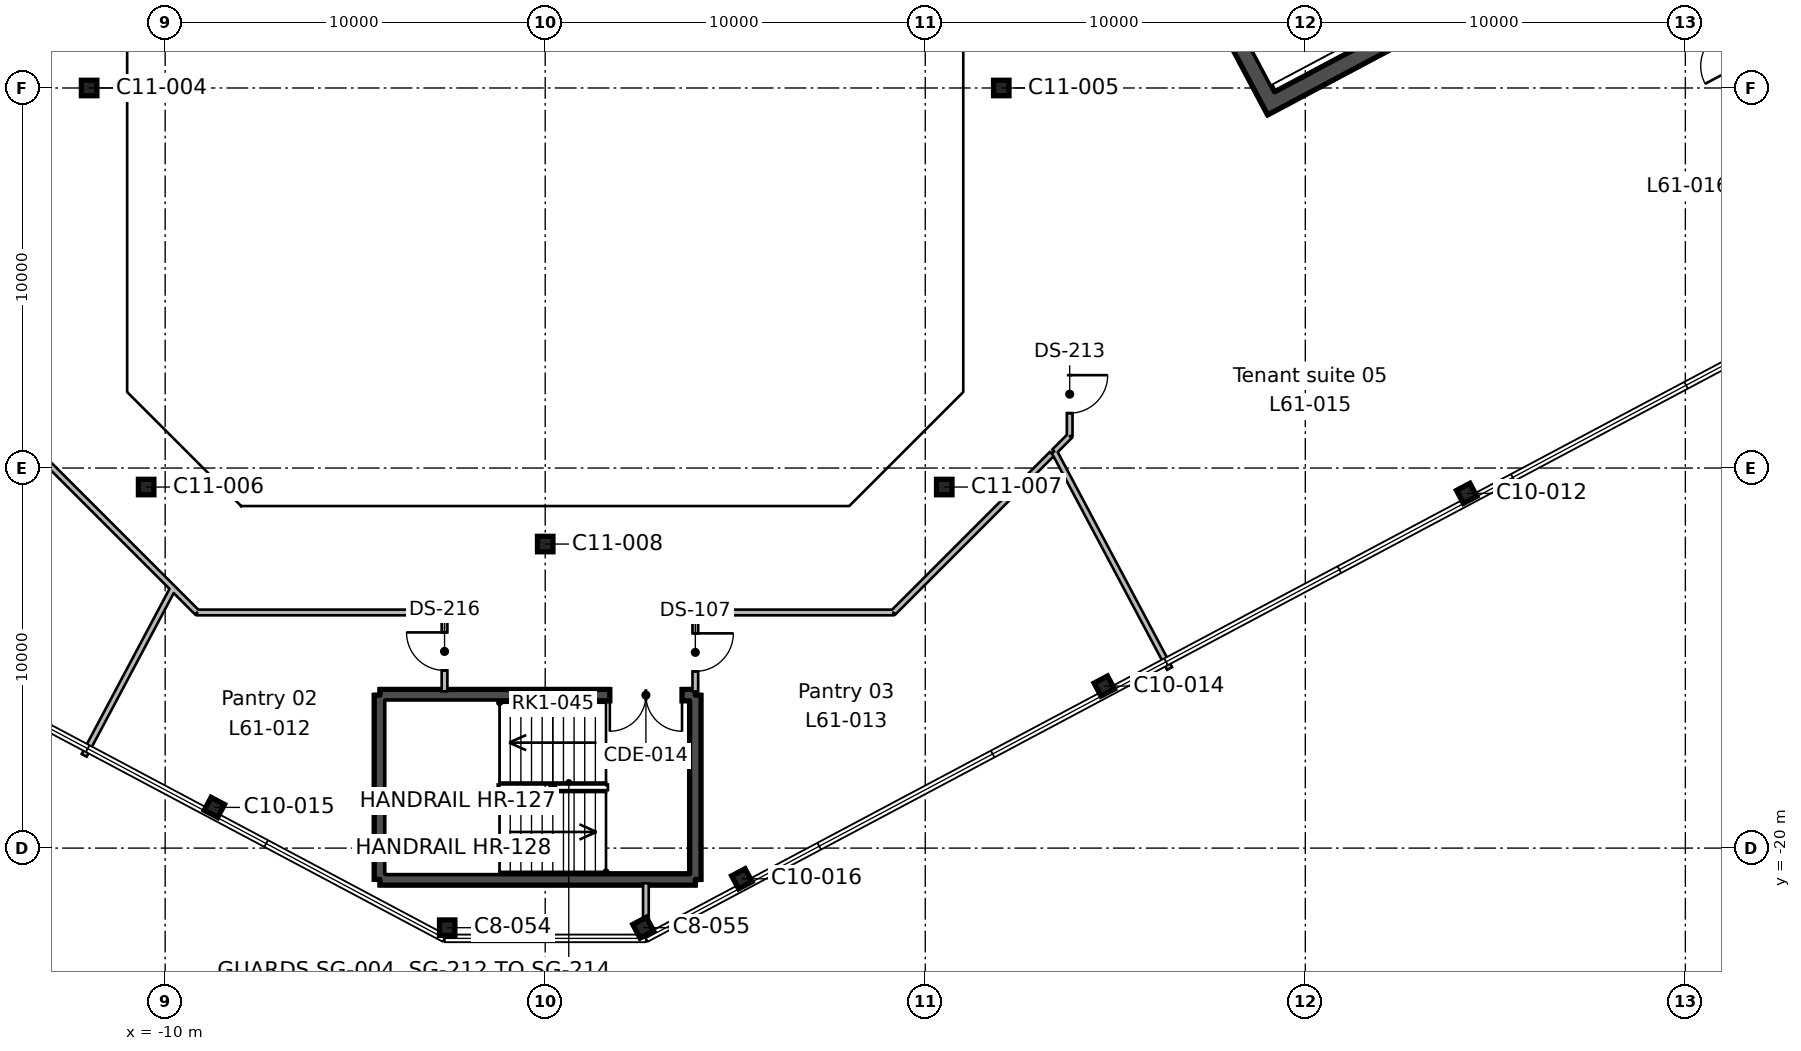
"""IFC4 building model, lengths in metres.
Left out: names, types, materials, properties, quantities, classifications, styles, units other than length and angle.
Written with IfcOpenShell. Run it as: python <this file> out.ifc"""

import sys

from ifc_helpers import new_model, si_unit, direction, frame, frame_2d, origin, origin_2d, place, context, subcontext, project, spatial, rectangle, hollow_rectangle, i_section, extrude, element, fill, save


model = new_model("IFC4")
c1 = context("Model", 3, precision=1e-05, world=origin(), true_north=direction((0.0, 1.0)))
c2 = subcontext(c1, "Body", "Model", "MODEL_VIEW")
j1 = project(units=[si_unit("LENGTHUNIT", "METRE"), si_unit("PLANEANGLEUNIT", "RADIAN")], contexts=[c1])
p1 = place(None, origin())
s1 = spatial("IfcSite", under=j1, at=p1, CompositionType="ELEMENT")
p2 = place(p1, origin())
s2 = spatial("IfcBuilding", under=s1, at=p2, CompositionType="ELEMENT")
p3 = place(p2, frame((0.0, 0.0, 273.6)))
s3 = spatial("IfcBuildingStorey", under=s2, at=p3, CompositionType="ELEMENT", Elevation=273.6)
for number, where, z_axis, x_axis in (
    (1, (-2.579, -22.094, 0.0), (0.0, 0.0, 1.0), (1.0, 0.0, 0.0)),
    (2, (2.579, -22.094, 0.0), (0.0, 0.0, 1.0), (0.883, 0.469, 0.0)),
):
    element("IfcColumn", number, at=place(p3, frame(where, z_axis=z_axis, x_axis=x_axis)), inside=s3, PredefinedType="COLUMN", context=c2, shape_type="SweptSolid", body=[
        extrude(i_section(OverallWidth=0.404, OverallDepth=0.406, WebThickness=0.027, FlangeThickness=0.044, FilletRadius=0.015, at=origin_2d()), origin(), (0.0, 0.0, 1.0), 3.9),
    ])
for number, where, z_axis, x_axis in (
    (3, (5.174, -20.807, 0.0), (0.0, 0.0, 1.0), (0.883, 0.469, 0.0)),
    (4, (-8.705, -18.929, 0.0), (0.0, 0.0, 1.0), (0.883, -0.469, 0.0)),
    (5, (14.71, -15.736, 0.0), (0.0, 0.0, 1.0), (0.883, 0.469, 0.0)),
):
    element("IfcColumn", number, at=place(p3, frame(where, z_axis=z_axis, x_axis=x_axis)), inside=s3, PredefinedType="COLUMN", context=c2, shape_type="SweptSolid", body=[
        extrude(i_section(OverallWidth=0.399, OverallDepth=0.386, WebThickness=0.021, FlangeThickness=0.033, FilletRadius=0.015, at=origin_2d()), origin(), (0.0, 0.0, 1.0), 3.9),
    ])
p4 = place(p3, frame((0.0, -12.0, 0.0), z_axis=(0.0, 0.0, 1.0), x_axis=(1.0, 0.0, 0.0)))
e6 = element("IfcColumn", 6, at=p4, inside=s3, PredefinedType="COLUMN", context=c2, shape_type="SweptSolid", body=[
    extrude(hollow_rectangle(XDim=0.406, YDim=0.406, WallThickness=0.009, InnerFilletRadius=0.004, OuterFilletRadius=0.013, at=origin_2d()), origin(), (0.0, 0.0, 1.0), 3.9),
])
p5 = place(p3, frame((24.245, -10.666, 0.0), z_axis=(0.0, 0.0, 1.0), x_axis=(0.882947592859, 0.469471562786, 0.0)))
e7 = element("IfcColumn", 7, at=p5, inside=s3, PredefinedType="COLUMN", context=c2, shape_type="SweptSolid", body=[
    extrude(i_section(OverallWidth=0.399, OverallDepth=0.386, WebThickness=0.021, FlangeThickness=0.033, FilletRadius=0.015, at=origin_2d()), origin(), (0.0, 0.0, 1.0), 3.9),
])
for number, where, z_axis, x_axis in (
    (8, (-10.5, -10.5, 0.0), (0.0, 0.0, 1.0), (1.0, 0.0, 0.0)),
    (9, (10.5, -10.5, 0.0), (0.0, 0.0, 1.0), (1.0, 0.0, 0.0)),
    (10, (-12.0, 0.0, 0.0), (0.0, 0.0, 1.0), (1.0, 0.0, 0.0)),
    (11, (12.0, 0.0, 0.0), (0.0, 0.0, 1.0), (1.0, 0.0, 0.0)),
):
    element("IfcColumn", number, at=place(p3, frame(where, z_axis=z_axis, x_axis=x_axis)), inside=s3, PredefinedType="COLUMN", context=c2, shape_type="SweptSolid", body=[
        extrude(hollow_rectangle(XDim=0.406, YDim=0.406, WallThickness=0.009, InnerFilletRadius=0.004, OuterFilletRadius=0.013, at=origin_2d()), origin(), (0.0, 0.0, 1.0), 3.9),
    ])
p6 = place(p3, frame((19.207, -0.604, 0.0), z_axis=(0.0, 0.0, 1.0), x_axis=(-0.469467968382, 0.882949504028, 0.0)))
e12 = element("IfcWall", 12, at=p6, inside=s3, PredefinedType="SHEAR", context=c2, shape_type="SweptSolid", body=[
    extrude(rectangle(XDim=19.1, YDim=0.45, at=frame_2d((9.55, 0.0))), origin(), (0.0, 0.0, 1.0), 3.9),
])
p7 = place(p6, frame((6.55, 0.0, 0.0)))
e13 = element("IfcOpeningElement", 13, at=p7, cuts=e12, PredefinedType="OPENING", context=c2, shape_type="SweptSolid", body=[
    extrude(rectangle(XDim=2.4, YDim=2.4, at=frame_2d((1.2, 1.2))), frame((0.0, 0.235, 0.0), z_axis=(0.0, -1.0, 0.0), x_axis=(1.0, 0.0, 0.0)), (0.0, 0.0, 1.0), 0.47),
])
p8 = place(p3, frame((19.3, -0.299, 0.0), z_axis=(0.0, 0.0, 1.0), x_axis=(0.88295276571, 0.46946183394, 0.0)))
e14 = element("IfcWall", 14, at=p8, inside=s3, PredefinedType="SHEAR", context=c2, shape_type="SweptSolid", body=[
    extrude(rectangle(XDim=20.2, YDim=0.45, at=frame_2d((10.1, 0.0))), origin(), (0.0, 0.0, 1.0), 3.9),
])
p9 = place(p3, frame((3.95, -15.975, 0.0), z_axis=(0.0, 0.0, 1.0), x_axis=(0.0, -1.0, 0.0)))
e15 = element("IfcWall", 15, at=p9, inside=s3, PredefinedType="SHEAR", context=c2, shape_type="SweptSolid", body=[
    extrude(rectangle(XDim=4.85, YDim=0.3, at=frame_2d((2.425, 0.0))), origin(), (0.0, 0.0, 1.0), 3.9),
])
p10 = place(p3, frame((3.95, -20.825, 0.0), z_axis=(0.0, 0.0, 1.0), x_axis=(-1.0, 0.0, 0.0)))
e16 = element("IfcWall", 16, at=p10, inside=s3, PredefinedType="SHEAR", context=c2, shape_type="SweptSolid", body=[
    extrude(rectangle(XDim=8.3, YDim=0.3, at=frame_2d((4.15, 0.0))), origin(), (0.0, 0.0, 1.0), 3.9),
])
p11 = place(p3, frame((-4.35, -20.825, 0.0), z_axis=(0.0, 0.0, 1.0), x_axis=(0.0, 1.0, 0.0)))
e17 = element("IfcWall", 17, at=p11, inside=s3, PredefinedType="SHEAR", context=c2, shape_type="SweptSolid", body=[
    extrude(rectangle(XDim=4.85, YDim=0.3, at=frame_2d((2.425, 0.0))), origin(), (0.0, 0.0, 1.0), 3.9),
])
p12 = place(p3, frame((-4.35, -15.975, 0.0), z_axis=(0.0, 0.0, 1.0), x_axis=(1.0, 0.0, 0.0)))
e18 = element("IfcWall", 18, at=p12, inside=s3, PredefinedType="SHEAR", context=c2, shape_type="SweptSolid", body=[
    extrude(rectangle(XDim=8.3, YDim=0.3, at=frame_2d((4.15, 0.0))), origin(), (0.0, 0.0, 1.0), 3.9),
])
p13 = place(p12, frame((6.05, 0.0, 0.0)))
e19 = element("IfcOpeningElement", 19, at=p13, cuts=e18, PredefinedType="OPENING", context=c2, shape_type="SweptSolid", body=[
    extrude(rectangle(XDim=1.9, YDim=2.1, at=frame_2d((0.95, 1.05))), frame((0.0, 0.16, 0.0), z_axis=(0.0, -1.0, 0.0), x_axis=(1.0, 0.0, 0.0)), (0.0, 0.0, 1.0), 0.32),
])
p14 = place(p3, frame((-9.899, -13.06, 0.0), z_axis=(0.0, 0.0, 1.0), x_axis=(-0.707195291234, 0.707018260058, 0.0)))
e20 = element("IfcWall", 20, at=p14, inside=s3, PredefinedType="PARTITIONING", context=c2, shape_type="SweptSolid", body=[
    extrude(rectangle(XDim=5.516, YDim=0.15, at=frame_2d((2.758, 0.0))), origin(), (0.0, 0.0, 1.0), 3.54),
])
p15 = place(p3, frame((-9.794, -13.165, 0.0), z_axis=(0.0, 0.0, 1.0), x_axis=(-0.469669090987, -0.882842536906, 0.0)))
e21 = element("IfcWall", 21, at=p15, inside=s3, PredefinedType="PARTITIONING", context=c2, shape_type="SweptSolid", body=[
    extrude(rectangle(XDim=4.978, YDim=0.15, at=frame_2d((2.489, 0.0))), origin(), (0.0, 0.0, 1.0), 3.54),
])
p16 = place(p3, frame((-9.16, -13.8, 0.0), z_axis=(0.0, 0.0, 1.0), x_axis=(-0.706639735909, 0.707573518183, 0.0)))
e22 = element("IfcWall", 22, at=p16, inside=s3, PredefinedType="PARTITIONING", context=c2, shape_type="SweptSolid", body=[
    extrude(rectangle(XDim=1.046, YDim=0.15, at=frame_2d((0.523, 0.0))), origin(), (0.0, 0.0, 1.0), 3.54),
])
p17 = place(p3, frame((-2.649, -15.875, 0.0), z_axis=(0.0, 0.0, 1.0), x_axis=(0.0, 1.0, 0.0)))
e23 = element("IfcWall", 23, at=p17, inside=s3, PredefinedType="PARTITIONING", context=c2, shape_type="SweptSolid", body=[
    extrude(rectangle(XDim=2.075, YDim=0.15, at=frame_2d((1.038, 0.0))), origin(), (0.0, 0.0, 1.0), 3.54),
])
p18 = place(p17, frame((0.55, 0.0, 0.0)))
e24 = element("IfcOpeningElement", 24, at=p18, cuts=e23, PredefinedType="OPENING", context=c2, shape_type="SweptSolid", body=[
    extrude(rectangle(XDim=1.0, YDim=2.1, at=frame_2d((0.5, 1.05))), frame((0.0, 0.085, 0.0), z_axis=(0.0, -1.0, 0.0), x_axis=(1.0, 0.0, 0.0)), (0.0, 0.0, 1.0), 0.17),
])
p19 = place(p3, frame((-2.649, -13.8, 0.0), z_axis=(0.0, 0.0, 1.0), x_axis=(-1.0, 0.0, 0.0)))
e25 = element("IfcWall", 25, at=p19, inside=s3, PredefinedType="PARTITIONING", context=c2, shape_type="SweptSolid", body=[
    extrude(rectangle(XDim=6.511, YDim=0.15, at=frame_2d((3.255, 0.0))), origin(), (0.0, 0.0, 1.0), 3.54),
])
p20 = place(p3, frame((2.649, -21.827, 0.0), z_axis=(0.0, 0.0, 1.0), x_axis=(0.0, 1.0, 0.0)))
e26 = element("IfcWall", 26, at=p20, inside=s3, PredefinedType="PARTITIONING", context=c2, shape_type="SweptSolid", body=[
    extrude(rectangle(XDim=0.902, YDim=0.15, at=frame_2d((0.451, 0.0))), origin(), (0.0, 0.0, 1.0), 3.54),
])
p21 = place(p3, frame((3.95, -13.8, 0.0), z_axis=(0.0, 0.0, 1.0), x_axis=(0.0, -1.0, 0.0)))
e27 = element("IfcWall", 27, at=p21, inside=s3, PredefinedType="PARTITIONING", context=c2, shape_type="SweptSolid", body=[
    extrude(rectangle(XDim=2.075, YDim=0.15, at=frame_2d((1.038, 0.0))), origin(), (0.0, 0.0, 1.0), 3.54),
])
p22 = place(p21, frame((0.55, 0.0, 0.0)))
e28 = element("IfcOpeningElement", 28, at=p22, cuts=e27, PredefinedType="OPENING", context=c2, shape_type="SweptSolid", body=[
    extrude(rectangle(XDim=1.0, YDim=2.1, at=frame_2d((0.5, 1.05))), frame((0.0, 0.085, 0.0), z_axis=(0.0, -1.0, 0.0), x_axis=(1.0, 0.0, 0.0)), (0.0, 0.0, 1.0), 0.17),
])
p23 = place(p3, frame((13.331, -9.629, 0.0), z_axis=(0.0, 0.0, 1.0), x_axis=(-0.707106781187, -0.707106781187, 0.0)))
e29 = element("IfcWall", 29, at=p23, inside=s3, PredefinedType="PARTITIONING", context=c2, shape_type="SweptSolid", body=[
    extrude(rectangle(XDim=5.899, YDim=0.15, at=frame_2d((2.949, 0.0))), origin(), (0.0, 0.0, 1.0), 3.54),
])
p24 = place(p3, frame((9.16, -13.8, 0.0), z_axis=(0.0, 0.0, 1.0), x_axis=(-1.0, 0.0, 0.0)))
e30 = element("IfcWall", 30, at=p24, inside=s3, PredefinedType="PARTITIONING", context=c2, shape_type="SweptSolid", body=[
    extrude(rectangle(XDim=5.135, YDim=0.15, at=frame_2d((2.567, 0.0))), origin(), (0.0, 0.0, 1.0), 3.54),
])
p25 = place(p3, frame((13.393, -9.567, 0.0), z_axis=(0.0, 0.0, 1.0), x_axis=(0.469578527863, -0.882890710207, 0.0)))
e31 = element("IfcWall", 31, at=p25, inside=s3, PredefinedType="PARTITIONING", context=c2, shape_type="SweptSolid", body=[
    extrude(rectangle(XDim=6.465, YDim=0.15, at=frame_2d((3.232, 0.0))), origin(), (0.0, 0.0, 1.0), 3.54),
])
p26 = place(p3, frame((13.8, -7.006, 0.0), z_axis=(0.0, 0.0, 1.0), x_axis=(0.0, -1.0, 0.0)))
e32 = element("IfcWall", 32, at=p26, inside=s3, PredefinedType="PARTITIONING", context=c2, shape_type="SweptSolid", body=[
    extrude(rectangle(XDim=2.154, YDim=0.15, at=frame_2d((1.077, 0.0))), origin(), (0.0, 0.0, 1.0), 3.54),
])
p27 = place(p26, frame((0.55, 0.0, 0.0)))
e33 = element("IfcOpeningElement", 33, at=p27, cuts=e32, PredefinedType="OPENING", context=c2, shape_type="SweptSolid", body=[
    extrude(rectangle(XDim=1.0, YDim=2.1, at=frame_2d((0.5, 1.05))), frame((0.0, 0.085, 0.0), z_axis=(0.0, -1.0, 0.0), x_axis=(1.0, 0.0, 0.0)), (0.0, 0.0, 1.0), 0.17),
])
p28 = place(p3, frame((13.395, -9.565, 0.0), z_axis=(0.0, 0.0, 1.0), x_axis=(0.706254846232, 0.707957690949, 0.0)))
e34 = element("IfcWall", 34, at=p28, inside=s3, PredefinedType="PARTITIONING", context=c2, shape_type="SweptSolid", body=[
    extrude(rectangle(XDim=0.573, YDim=0.15, at=frame_2d((0.287, 0.0))), origin(), (0.0, 0.0, 1.0), 3.54),
])
p29 = place(p3, frame((13.8, -7.006, 0.0), z_axis=(0.0, 0.0, 1.0), x_axis=(0.0, 1.0, 0.0)))
e35 = element("IfcWall", 35, at=p29, inside=s3, PredefinedType="PARTITIONING", context=c2, shape_type="SweptSolid", body=[
    extrude(rectangle(XDim=0.526, YDim=0.15, at=frame_2d((0.263, 0.0))), origin(), (0.0, 0.0, 1.0), 3.54),
])
p30 = place(p3, frame((25.889, -0.052, 0.0), z_axis=(0.0, 0.0, 1.0), x_axis=(0.469351570135, -0.883011383625, 0.0)))
e36 = element("IfcWall", 36, at=p30, inside=s3, PredefinedType="PARTITIONING", context=c2, shape_type="SweptSolid", body=[
    extrude(rectangle(XDim=9.0, YDim=0.15, at=frame_2d((4.5, 0.0))), origin(), (0.0, 0.0, 1.0), 3.54),
])
p31 = place(p3, frame((31.897, -0.347, 0.0), z_axis=(0.0, 0.0, 1.0), x_axis=(-0.469670796129, 0.882841629775, 0.0)))
e37 = element("IfcWall", 37, at=p31, inside=s3, PredefinedType="PARTITIONING", context=c2, shape_type="SweptSolid", body=[
    extrude(rectangle(XDim=3.081, YDim=0.15, at=frame_2d((1.541, 0.0))), origin(), (0.0, 0.0, 1.0), 3.54),
])
p32 = place(p31, frame((1.05, 0.0, 0.0)))
e38 = element("IfcOpeningElement", 38, at=p32, cuts=e37, PredefinedType="OPENING", context=c2, shape_type="SweptSolid", body=[
    extrude(rectangle(XDim=1.0, YDim=2.1, at=frame_2d((0.5, 1.05))), frame((0.0, 0.085, 0.0), z_axis=(0.0, -1.0, 0.0), x_axis=(1.0, 0.0, 0.0)), (0.0, 0.0, 1.0), 0.17),
])
p33 = place(p3, frame((30.45, 2.373, 0.0), z_axis=(0.0, 0.0, 1.0), x_axis=(-0.882945015872, -0.46947640936, 0.0)))
e39 = element("IfcWall", 39, at=p33, inside=s3, PredefinedType="PARTITIONING", context=c2, shape_type="SweptSolid", body=[
    extrude(rectangle(XDim=18.857, YDim=0.15, at=frame_2d((9.429, 0.0))), origin(), (0.0, 0.0, 1.0), 3.54),
])
p34 = place(p3, frame((-20.588, -0.379, 0.0), z_axis=(0.0, 0.0, 1.0), x_axis=(0.469489882812, 0.882937851685, 0.0)))
e40 = element("IfcWall", 40, at=p34, inside=s3, PredefinedType="PARTITIONING", context=c2, shape_type="SweptSolid", body=[
    extrude(rectangle(XDim=20.0, YDim=0.15, at=frame_2d((10.0, 0.0))), origin(), (0.0, 0.0, 1.0), 3.54),
])
p35 = place(p34, frame((9.55, 0.0, 0.0)))
e41 = element("IfcOpeningElement", 41, at=p35, cuts=e40, PredefinedType="OPENING", context=c2, shape_type="SweptSolid", body=[
    extrude(rectangle(XDim=1.0, YDim=2.1, at=frame_2d((0.5, 1.05))), frame((0.0, 0.085, 0.0), z_axis=(0.0, -1.0, 0.0), x_axis=(1.0, 0.0, 0.0)), (0.0, 0.0, 1.0), 0.17),
])
p36 = place(p3, frame((13.8, -3.988, 0.0), z_axis=(0.0, 0.0, 1.0), x_axis=(0.882971660552, 0.469426295239, 0.0)))
e42 = element("IfcWall", 42, at=p36, inside=s3, PredefinedType="PARTITIONING", context=c2, shape_type="SweptSolid", body=[
    extrude(rectangle(XDim=3.688, YDim=0.15, at=frame_2d((1.844, 0.0))), origin(), (0.0, 0.0, 1.0), 3.54),
])
p37 = place(p3, frame((17.056, -2.257, 0.0), z_axis=(0.0, 0.0, 1.0), x_axis=(-0.469433160251, 0.882968010778, 0.0)))
e43 = element("IfcWall", 43, at=p37, inside=s3, PredefinedType="PARTITIONING", context=c2, shape_type="SweptSolid", body=[
    extrude(rectangle(XDim=6.936, YDim=0.15, at=frame_2d((3.468, 0.0))), origin(), (0.0, 0.0, 1.0), 3.54),
])
p38 = place(p3, frame((13.8, 3.867, 0.0), z_axis=(0.0, 0.0, 1.0), x_axis=(0.0, -1.0, 0.0)))
e44 = element("IfcWall", 44, at=p38, inside=s3, PredefinedType="PARTITIONING", context=c2, shape_type="SweptSolid", body=[
    extrude(rectangle(XDim=7.855, YDim=0.15, at=frame_2d((3.927, 0.0))), origin(), (0.0, 0.0, 1.0), 3.54),
])
p39 = place(p13, frame((1.9, 0.0, 0.0), z_axis=(0.0, 0.0, 1.0), x_axis=(-1.0, 0.0, 0.0)))
e45 = element("IfcDoor", 45, at=p39, inside=s3, OperationType="DOUBLE_DOOR_SINGLE_SWING", PredefinedType="DOOR", context=c2, shape_type="SweptSolid", body=[
    extrude(rectangle(XDim=1.9, YDim=2.1, at=frame_2d((0.95, 1.05))), frame((0.0, 0.025, 0.0), z_axis=(0.0, -1.0, 0.0), x_axis=(1.0, 0.0, 0.0)), (0.0, 0.0, 1.0), 0.05),
])
fill(e19, e45)
p40 = place(p22, origin())
e46 = element("IfcDoor", 46, at=p40, inside=s3, OperationType="SINGLE_SWING_LEFT", PredefinedType="DOOR", context=c2, shape_type="SweptSolid", body=[
    extrude(rectangle(XDim=1.0, YDim=2.1, at=frame_2d((0.5, 1.05))), frame((0.0, 0.025, 0.0), z_axis=(0.0, -1.0, 0.0), x_axis=(1.0, 0.0, 0.0)), (0.0, 0.0, 1.0), 0.05),
])
fill(e28, e46)
p41 = place(p27, origin())
e47 = element("IfcDoor", 47, at=p41, inside=s3, OperationType="SINGLE_SWING_LEFT", PredefinedType="DOOR", context=c2, shape_type="SweptSolid", body=[
    extrude(rectangle(XDim=1.0, YDim=2.1, at=frame_2d((0.5, 1.05))), frame((0.0, 0.025, 0.0), z_axis=(0.0, -1.0, 0.0), x_axis=(1.0, 0.0, 0.0)), (0.0, 0.0, 1.0), 0.05),
])
fill(e33, e47)
p42 = place(p32, origin())
e48 = element("IfcDoor", 48, at=p42, inside=s3, OperationType="SINGLE_SWING_LEFT", PredefinedType="DOOR", context=c2, shape_type="SweptSolid", body=[
    extrude(rectangle(XDim=1.0, YDim=2.1, at=frame_2d((0.5, 1.05))), frame((0.0, 0.025, 0.0), z_axis=(0.0, -1.0, 0.0), x_axis=(1.0, 0.0, 0.0)), (0.0, 0.0, 1.0), 0.05),
])
fill(e38, e48)
p43 = place(p18, origin())
e49 = element("IfcDoor", 49, at=p43, inside=s3, OperationType="SINGLE_SWING_RIGHT", PredefinedType="DOOR", context=c2, shape_type="SweptSolid", body=[
    extrude(rectangle(XDim=1.0, YDim=2.1, at=frame_2d((0.5, 1.05))), frame((0.0, 0.025, 0.0), z_axis=(0.0, -1.0, 0.0), x_axis=(1.0, 0.0, 0.0)), (0.0, 0.0, 1.0), 0.05),
])
fill(e24, e49)
save(model, sys.argv[1])
